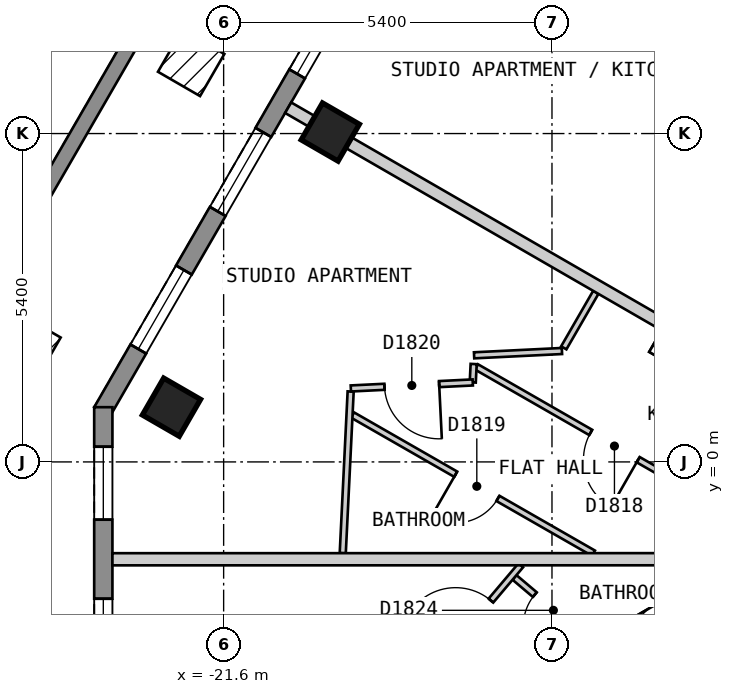
"""IFC4 building model, lengths in metres.
Left out: names, types, materials, properties, quantities, classifications, styles, units other than length and angle.
Written with IfcOpenShell. Run it as: python <this file> out.ifc"""

import sys

from ifc_helpers import new_model, si_unit, direction, frame, frame_2d, origin, origin_2d, place, context, subcontext, project, spatial, polyline, rectangle, outline, extrude, element, fill, save


model = new_model("IFC4")
c1 = context("Model", 3, precision=1e-05, world=origin(), true_north=direction((0.0, 1.0)))
c2 = subcontext(c1, "Body", "Model", "MODEL_VIEW")
j1 = project(units=[si_unit("LENGTHUNIT", "METRE"), si_unit("PLANEANGLEUNIT", "RADIAN")], contexts=[c1])
p1 = place(None, origin())
s1 = spatial("IfcSite", under=j1, at=p1, CompositionType="ELEMENT")
p2 = place(p1, origin())
s2 = spatial("IfcBuilding", under=s1, at=p2, CompositionType="ELEMENT")
p3 = place(p2, frame((0.0, 0.0, 202.8)))
s3 = spatial("IfcBuildingStorey", under=s2, at=p3, CompositionType="ELEMENT", Elevation=202.8)
for number, where, z_axis, x_axis in (
    (1, (-19.846, 5.425, 0.0), (0.0, 0.0, 1.0), (-0.5, -0.866, 0.0)),
    (2, (-22.458, 0.9, 0.0), (0.0, 0.0, 1.0), (-0.5, -0.866, 0.0)),
):
    element("IfcColumn", number, at=place(p3, frame(where, z_axis=z_axis, x_axis=x_axis)), inside=s3, PredefinedType="COLUMN", context=c2, shape_type="SweptSolid", body=[
        extrude(rectangle(XDim=0.7, YDim=0.7, at=origin_2d()), origin(), (0.0, 0.0, 1.0), 3.0),
    ])
p4 = place(p3, frame((-12.514, 20.025, 0.0), z_axis=(0.0, 0.0, 1.0), x_axis=(-0.500003656944, -0.866023292436, 0.0)))
e3 = element("IfcWall", 3, at=p4, inside=s3, PredefinedType="SOLIDWALL", context=c2, shape_type="SweptSolid", body=[
    extrude(outline(polyline([(0.0, -0.15), (22.17, -0.15), (22.09, 0.15), (0.08, 0.15), (0.0, -0.15)])), origin(), (0.0, 0.0, 1.0), 2.7),
])
p5 = place(p4, frame((1.191, 0.0, 0.15)))
e4 = element("IfcOpeningElement", 4, at=p5, cuts=e3, PredefinedType="OPENING", context=c2, shape_type="SweptSolid", body=[
    extrude(rectangle(XDim=1.5, YDim=2.1, at=frame_2d((0.75, 1.05))), frame((0.0, 0.16, 0.0), z_axis=(0.0, -1.0, 0.0), x_axis=(1.0, 0.0, 0.0)), (0.0, 0.0, 1.0), 0.32),
])
p6 = place(p4, frame((3.804, 0.0, 0.15)))
e5 = element("IfcOpeningElement", 5, at=p6, cuts=e3, PredefinedType="OPENING", context=c2, shape_type="SweptSolid", body=[
    extrude(rectangle(XDim=1.5, YDim=2.1, at=frame_2d((0.75, 1.05))), frame((0.0, 0.16, 0.0), z_axis=(0.0, -1.0, 0.0), x_axis=(1.0, 0.0, 0.0)), (0.0, 0.0, 1.0), 0.32),
])
p7 = place(p4, frame((6.416, 0.0, 0.15)))
e6 = element("IfcOpeningElement", 6, at=p7, cuts=e3, PredefinedType="OPENING", context=c2, shape_type="SweptSolid", body=[
    extrude(rectangle(XDim=1.5, YDim=2.1, at=frame_2d((0.75, 1.05))), frame((0.0, 0.16, 0.0), z_axis=(0.0, -1.0, 0.0), x_axis=(1.0, 0.0, 0.0)), (0.0, 0.0, 1.0), 0.32),
])
p8 = place(p4, frame((9.029, 0.0, 0.15)))
e7 = element("IfcOpeningElement", 7, at=p8, cuts=e3, PredefinedType="OPENING", context=c2, shape_type="SweptSolid", body=[
    extrude(rectangle(XDim=1.5, YDim=2.1, at=frame_2d((0.75, 1.05))), frame((0.0, 0.16, 0.0), z_axis=(0.0, -1.0, 0.0), x_axis=(1.0, 0.0, 0.0)), (0.0, 0.0, 1.0), 0.32),
])
p9 = place(p4, frame((11.641, 0.0, 0.15)))
e8 = element("IfcOpeningElement", 8, at=p9, cuts=e3, PredefinedType="OPENING", context=c2, shape_type="SweptSolid", body=[
    extrude(rectangle(XDim=1.5, YDim=2.1, at=frame_2d((0.75, 1.05))), frame((0.0, 0.16, 0.0), z_axis=(0.0, -1.0, 0.0), x_axis=(1.0, 0.0, 0.0)), (0.0, 0.0, 1.0), 0.32),
])
p10 = place(p4, frame((14.254, 0.0, 0.15)))
e9 = element("IfcOpeningElement", 9, at=p10, cuts=e3, PredefinedType="OPENING", context=c2, shape_type="SweptSolid", body=[
    extrude(rectangle(XDim=1.5, YDim=2.1, at=frame_2d((0.75, 1.05))), frame((0.0, 0.16, 0.0), z_axis=(0.0, -1.0, 0.0), x_axis=(1.0, 0.0, 0.0)), (0.0, 0.0, 1.0), 0.32),
])
p11 = place(p4, frame((16.866, 0.0, 0.15)))
e10 = element("IfcOpeningElement", 10, at=p11, cuts=e3, PredefinedType="OPENING", context=c2, shape_type="SweptSolid", body=[
    extrude(rectangle(XDim=1.5, YDim=2.1, at=frame_2d((0.75, 1.05))), frame((0.0, 0.16, 0.0), z_axis=(0.0, -1.0, 0.0), x_axis=(1.0, 0.0, 0.0)), (0.0, 0.0, 1.0), 0.32),
])
p12 = place(p4, frame((19.479, 0.0, 0.15)))
e11 = element("IfcOpeningElement", 11, at=p12, cuts=e3, PredefinedType="OPENING", context=c2, shape_type="SweptSolid", body=[
    extrude(rectangle(XDim=1.5, YDim=2.1, at=frame_2d((0.75, 1.05))), frame((0.0, 0.16, 0.0), z_axis=(0.0, -1.0, 0.0), x_axis=(1.0, 0.0, 0.0)), (0.0, 0.0, 1.0), 0.32),
])
p13 = place(p3, frame((-23.579, 0.9, 0.0), z_axis=(0.0, 0.0, 1.0), x_axis=(0.0, -1.0, 0.0)))
e12 = element("IfcWall", 12, at=p13, inside=s3, PredefinedType="SOLIDWALL", context=c2, shape_type="SweptSolid", body=[
    extrude(outline(polyline([(0.0, -0.15), (5.0, -0.15), (4.92, 0.15), (0.08, 0.15), (0.0, -0.15)])), origin(), (0.0, 0.0, 1.0), 2.7),
])
p14 = place(p13, frame((0.65, 0.0, 0.15)))
e13 = element("IfcOpeningElement", 13, at=p14, cuts=e12, PredefinedType="OPENING", context=c2, shape_type="SweptSolid", body=[
    extrude(rectangle(XDim=1.2, YDim=2.1, at=frame_2d((0.6, 1.05))), frame((0.0, 0.16, 0.0), z_axis=(0.0, -1.0, 0.0), x_axis=(1.0, 0.0, 0.0)), (0.0, 0.0, 1.0), 0.32),
])
p15 = place(p13, frame((3.15, 0.0, 0.15)))
e14 = element("IfcOpeningElement", 14, at=p15, cuts=e12, PredefinedType="OPENING", context=c2, shape_type="SweptSolid", body=[
    extrude(rectangle(XDim=1.2, YDim=2.1, at=frame_2d((0.6, 1.05))), frame((0.0, 0.16, 0.0), z_axis=(0.0, -1.0, 0.0), x_axis=(1.0, 0.0, 0.0)), (0.0, 0.0, 1.0), 0.32),
])
p16 = place(p3, frame((-26.046, 1.838, 0.0), z_axis=(0.0, 0.0, 1.0), x_axis=(0.500061067893, 0.865990143349, 0.0)))
e15 = element("IfcWall", 15, at=p16, inside=s3, PredefinedType="PARAPET", context=c2, shape_type="SweptSolid", body=[
    extrude(outline(polyline([(0.067, -0.125), (22.796, -0.125), (22.863, 0.125), (0.0, 0.125), (0.067, -0.125)])), origin(), (0.0, 0.0, 1.0), 1.6),
])
p17 = place(p3, frame((-17.441, 1.562, 0.0), z_axis=(0.0, 0.0, 1.0), x_axis=(0.867419073464, -0.497578286293, 0.0)))
e16 = element("IfcWall", 16, at=p17, inside=s3, PredefinedType="PARTITIONING", context=c2, shape_type="SweptSolid", body=[
    extrude(rectangle(XDim=5.185, YDim=0.1, at=frame_2d((2.593, 0.0))), origin(), (0.0, 0.0, 1.0), 2.7),
])
p18 = place(p17, frame((2.165, 0.0, 0.0)))
e17 = element("IfcOpeningElement", 17, at=p18, cuts=e16, PredefinedType="OPENING", context=c2, shape_type="SweptSolid", body=[
    extrude(rectangle(XDim=0.9, YDim=2.1, at=frame_2d((0.45, 1.05))), frame((0.0, 0.06, 0.0), z_axis=(0.0, -1.0, 0.0), x_axis=(1.0, 0.0, 0.0)), (0.0, 0.0, 1.0), 0.12),
])
p19 = place(p3, frame((-19.48, 0.771, 0.0), z_axis=(0.0, 0.0, 1.0), x_axis=(0.86748552317, -0.497462427817, 0.0)))
e18 = element("IfcWall", 18, at=p19, inside=s3, PredefinedType="PARTITIONING", context=c2, shape_type="SweptSolid", body=[
    extrude(rectangle(XDim=4.567, YDim=0.1, at=frame_2d((2.284, 0.0))), origin(), (0.0, 0.0, 1.0), 2.7),
])
p20 = place(p19, frame((1.956, 0.0, 0.0)))
e19 = element("IfcOpeningElement", 19, at=p20, cuts=e18, PredefinedType="OPENING", context=c2, shape_type="SweptSolid", body=[
    extrude(rectangle(XDim=0.8, YDim=2.1, at=frame_2d((0.4, 1.05))), frame((0.0, 0.06, 0.0), z_axis=(0.0, -1.0, 0.0), x_axis=(1.0, 0.0, 0.0)), (0.0, 0.0, 1.0), 0.12),
])
p21 = place(p3, frame((-16.816, -1.9, 0.0), z_axis=(0.0, 0.0, 1.0), x_axis=(0.763509851459, -0.645796180482, 0.0)))
e20 = element("IfcWall", 20, at=p21, inside=s3, PredefinedType="PARTITIONING", context=c2, shape_type="SweptSolid", body=[
    extrude(rectangle(XDim=1.724, YDim=0.1, at=frame_2d((0.862, 0.0))), origin(), (0.0, 0.0, 1.0), 2.7),
])
p22 = place(p21, frame((0.437, 0.0, 0.0)))
e21 = element("IfcOpeningElement", 21, at=p22, cuts=e20, PredefinedType="OPENING", context=c2, shape_type="SweptSolid", body=[
    extrude(rectangle(XDim=0.8, YDim=2.1, at=frame_2d((0.4, 1.05))), frame((0.0, 0.06, 0.0), z_axis=(0.0, -1.0, 0.0), x_axis=(1.0, 0.0, 0.0)), (0.0, 0.0, 1.0), 0.12),
])
p23 = place(p3, frame((-19.625, -5.144, 0.0), z_axis=(0.0, 0.0, 1.0), x_axis=(0.645668001073, 0.763618250431, 0.0)))
e22 = element("IfcWall", 22, at=p23, inside=s3, PredefinedType="PARTITIONING", context=c2, shape_type="SweptSolid", body=[
    extrude(rectangle(XDim=4.51, YDim=0.1, at=frame_2d((2.255, 0.0))), origin(), (0.0, 0.0, 1.0), 2.7),
])
p24 = place(p23, frame((2.85, 0.0, 0.0)))
e23 = element("IfcOpeningElement", 23, at=p24, cuts=e22, PredefinedType="OPENING", context=c2, shape_type="SweptSolid", body=[
    extrude(rectangle(XDim=0.9, YDim=2.1, at=frame_2d((0.45, 1.05))), frame((0.0, 0.06, 0.0), z_axis=(0.0, -1.0, 0.0), x_axis=(1.0, 0.0, 0.0)), (0.0, 0.0, 1.0), 0.12),
])
p25 = place(p3, frame((-16.006, 1.876, 0.0), z_axis=(0.0, 0.0, 1.0), x_axis=(0.499949632511, 0.866054481515, 0.0)))
e24 = element("IfcWall", 24, at=p25, inside=s3, PredefinedType="PARTITIONING", context=c2, shape_type="SweptSolid", body=[
    extrude(rectangle(XDim=1.054, YDim=0.1, at=frame_2d((0.527, 0.0))), origin(), (0.0, 0.0, 1.0), 2.7),
])
p26 = place(p3, frame((-17.503, 1.307, 0.0), z_axis=(0.0, 0.0, 1.0), x_axis=(0.049055201451, 0.99879606888, 0.0)))
e25 = element("IfcWall", 25, at=p26, inside=s3, PredefinedType="PARTITIONING", context=c2, shape_type="SweptSolid", body=[
    extrude(rectangle(XDim=0.303, YDim=0.1, at=frame_2d((0.152, 0.0))), origin(), (0.0, 0.0, 1.0), 2.7),
])
p27 = place(p3, frame((-19.641, -1.5, 0.0), z_axis=(0.0, 0.0, 1.0), x_axis=(0.048898906005, 0.998803732968, 0.0)))
e26 = element("IfcWall", 26, at=p27, inside=s3, PredefinedType="PARTITIONING", context=c2, shape_type="SweptSolid", body=[
    extrude(rectangle(XDim=2.661, YDim=0.1, at=frame_2d((1.331, 0.0))), origin(), (0.0, 0.0, 1.0), 2.7),
])
p28 = place(p3, frame((-19.508, 1.208, 0.0), z_axis=(0.0, 0.0, 1.0), x_axis=(0.998786372978, 0.04925221978, 0.0)))
e27 = element("IfcWall", 27, at=p28, inside=s3, PredefinedType="PARTITIONING", context=c2, shape_type="SweptSolid", body=[
    extrude(rectangle(XDim=2.008, YDim=0.1, at=frame_2d((1.004, 0.0))), origin(), (0.0, 0.0, 1.0), 2.7),
])
p29 = place(p28, frame((0.554, 0.0, 0.0)))
e28 = element("IfcOpeningElement", 28, at=p29, cuts=e27, PredefinedType="OPENING", context=c2, shape_type="SweptSolid", body=[
    extrude(rectangle(XDim=0.9, YDim=2.1, at=frame_2d((0.45, 1.05))), frame((0.0, 0.06, 0.0), z_axis=(0.0, -1.0, 0.0), x_axis=(1.0, 0.0, 0.0)), (0.0, 0.0, 1.0), 0.12),
])
p30 = place(p3, frame((-17.481, 1.753, 0.0), z_axis=(0.0, 0.0, 1.0), x_axis=(0.998793651238, 0.049104401505, 0.0)))
e29 = element("IfcWall", 29, at=p30, inside=s3, PredefinedType="PARTITIONING", context=c2, shape_type="SweptSolid", body=[
    extrude(rectangle(XDim=1.447, YDim=0.1, at=frame_2d((0.723, 0.0))), origin(), (0.0, 0.0, 1.0), 2.7),
])
p31 = place(p3, frame((-20.539, 5.825, 0.0), z_axis=(0.0, 0.0, 1.0), x_axis=(0.866028187226, -0.499995178908, 0.0)))
e30 = element("IfcWall", 30, at=p31, inside=s3, PredefinedType="PARTITIONING", context=c2, shape_type="SweptSolid", body=[
    extrude(rectangle(XDim=9.996, YDim=0.2, at=frame_2d((4.998, 0.0))), origin(), (0.0, 0.0, 1.0), 2.7),
])
p32 = place(p3, frame((-17.926, 10.35, 0.0), z_axis=(0.0, 0.0, 1.0), x_axis=(0.866018411306, -0.500012111133, 0.0)))
e31 = element("IfcWall", 31, at=p32, inside=s3, PredefinedType="PARTITIONING", context=c2, shape_type="SweptSolid", body=[
    extrude(rectangle(XDim=9.898, YDim=0.2, at=frame_2d((4.949, 0.0))), origin(), (0.0, 0.0, 1.0), 2.7),
])
p33 = place(p3, frame((-23.429, -1.601, 0.0), z_axis=(0.0, 0.0, 1.0), x_axis=(0.999999995449, 9.5406191e-05, 0.0)))
e32 = element("IfcWall", 32, at=p33, inside=s3, PredefinedType="PARTITIONING", context=c2, shape_type="SweptSolid", body=[
    extrude(rectangle(XDim=10.236, YDim=0.2, at=frame_2d((5.118, 0.0))), origin(), (0.0, 0.0, 1.0), 2.7),
])
p34 = place(p10, origin())
e33 = element("IfcWindow", 33, at=p34, inside=s3, PartitioningType="SINGLE_PANEL", PredefinedType="WINDOW", context=c2, shape_type="SweptSolid", body=[
    extrude(rectangle(XDim=1.5, YDim=2.1, at=frame_2d((0.75, 1.05))), frame((0.0, 0.03, 0.0), z_axis=(0.0, -1.0, 0.0), x_axis=(1.0, 0.0, 0.0)), (0.0, 0.0, 1.0), 0.06),
])
fill(e9, e33)
p35 = place(p11, origin())
e34 = element("IfcWindow", 34, at=p35, inside=s3, PartitioningType="SINGLE_PANEL", PredefinedType="WINDOW", context=c2, shape_type="SweptSolid", body=[
    extrude(rectangle(XDim=1.5, YDim=2.1, at=frame_2d((0.75, 1.05))), frame((0.0, 0.03, 0.0), z_axis=(0.0, -1.0, 0.0), x_axis=(1.0, 0.0, 0.0)), (0.0, 0.0, 1.0), 0.06),
])
fill(e10, e34)
p36 = place(p12, origin())
e35 = element("IfcWindow", 35, at=p36, inside=s3, PartitioningType="SINGLE_PANEL", PredefinedType="WINDOW", context=c2, shape_type="SweptSolid", body=[
    extrude(rectangle(XDim=1.5, YDim=2.1, at=frame_2d((0.75, 1.05))), frame((0.0, 0.03, 0.0), z_axis=(0.0, -1.0, 0.0), x_axis=(1.0, 0.0, 0.0)), (0.0, 0.0, 1.0), 0.06),
])
fill(e11, e35)
p37 = place(p14, origin())
e36 = element("IfcWindow", 36, at=p37, inside=s3, PartitioningType="SINGLE_PANEL", PredefinedType="WINDOW", context=c2, shape_type="SweptSolid", body=[
    extrude(rectangle(XDim=1.2, YDim=2.1, at=frame_2d((0.6, 1.05))), frame((0.0, 0.03, 0.0), z_axis=(0.0, -1.0, 0.0), x_axis=(1.0, 0.0, 0.0)), (0.0, 0.0, 1.0), 0.06),
])
fill(e13, e36)
p38 = place(p15, origin())
e37 = element("IfcWindow", 37, at=p38, inside=s3, PartitioningType="SINGLE_PANEL", PredefinedType="WINDOW", context=c2, shape_type="SweptSolid", body=[
    extrude(rectangle(XDim=1.2, YDim=2.1, at=frame_2d((0.6, 1.05))), frame((0.0, 0.03, 0.0), z_axis=(0.0, -1.0, 0.0), x_axis=(1.0, 0.0, 0.0)), (0.0, 0.0, 1.0), 0.06),
])
fill(e14, e37)
p39 = place(p18, origin())
e38 = element("IfcDoor", 38, at=p39, inside=s3, OperationType="SINGLE_SWING_RIGHT", PredefinedType="DOOR", context=c2, shape_type="SweptSolid", body=[
    extrude(rectangle(XDim=0.9, YDim=2.1, at=frame_2d((0.45, 1.05))), frame((0.0, 0.025, 0.0), z_axis=(0.0, -1.0, 0.0), x_axis=(1.0, 0.0, 0.0)), (0.0, 0.0, 1.0), 0.05),
])
fill(e17, e38)
p40 = place(p20, origin())
e39 = element("IfcDoor", 39, at=p40, inside=s3, OperationType="SINGLE_SWING_LEFT", PredefinedType="DOOR", context=c2, shape_type="SweptSolid", body=[
    extrude(rectangle(XDim=0.8, YDim=2.1, at=frame_2d((0.4, 1.05))), frame((0.0, 0.025, 0.0), z_axis=(0.0, -1.0, 0.0), x_axis=(1.0, 0.0, 0.0)), (0.0, 0.0, 1.0), 0.05),
])
fill(e19, e39)
p41 = place(p29, origin())
e40 = element("IfcDoor", 40, at=p41, inside=s3, OperationType="SINGLE_SWING_RIGHT", PredefinedType="DOOR", context=c2, shape_type="SweptSolid", body=[
    extrude(rectangle(XDim=0.9, YDim=2.1, at=frame_2d((0.45, 1.05))), frame((0.0, 0.025, 0.0), z_axis=(0.0, -1.0, 0.0), x_axis=(1.0, 0.0, 0.0)), (0.0, 0.0, 1.0), 0.05),
])
fill(e28, e40)
p42 = place(p24, origin())
e41 = element("IfcDoor", 41, at=p42, inside=s3, OperationType="SINGLE_SWING_LEFT", PredefinedType="DOOR", context=c2, shape_type="SweptSolid", body=[
    extrude(rectangle(XDim=0.9, YDim=2.1, at=frame_2d((0.45, 1.05))), frame((0.0, 0.025, 0.0), z_axis=(0.0, -1.0, 0.0), x_axis=(1.0, 0.0, 0.0)), (0.0, 0.0, 1.0), 0.05),
])
fill(e23, e41)
p43 = place(p22, origin())
e42 = element("IfcDoor", 42, at=p43, inside=s3, OperationType="SINGLE_SWING_RIGHT", PredefinedType="DOOR", context=c2, shape_type="SweptSolid", body=[
    extrude(rectangle(XDim=0.8, YDim=2.1, at=frame_2d((0.4, 1.05))), frame((0.0, 0.025, 0.0), z_axis=(0.0, -1.0, 0.0), x_axis=(1.0, 0.0, 0.0)), (0.0, 0.0, 1.0), 0.05),
])
fill(e21, e42)
save(model, sys.argv[1])
